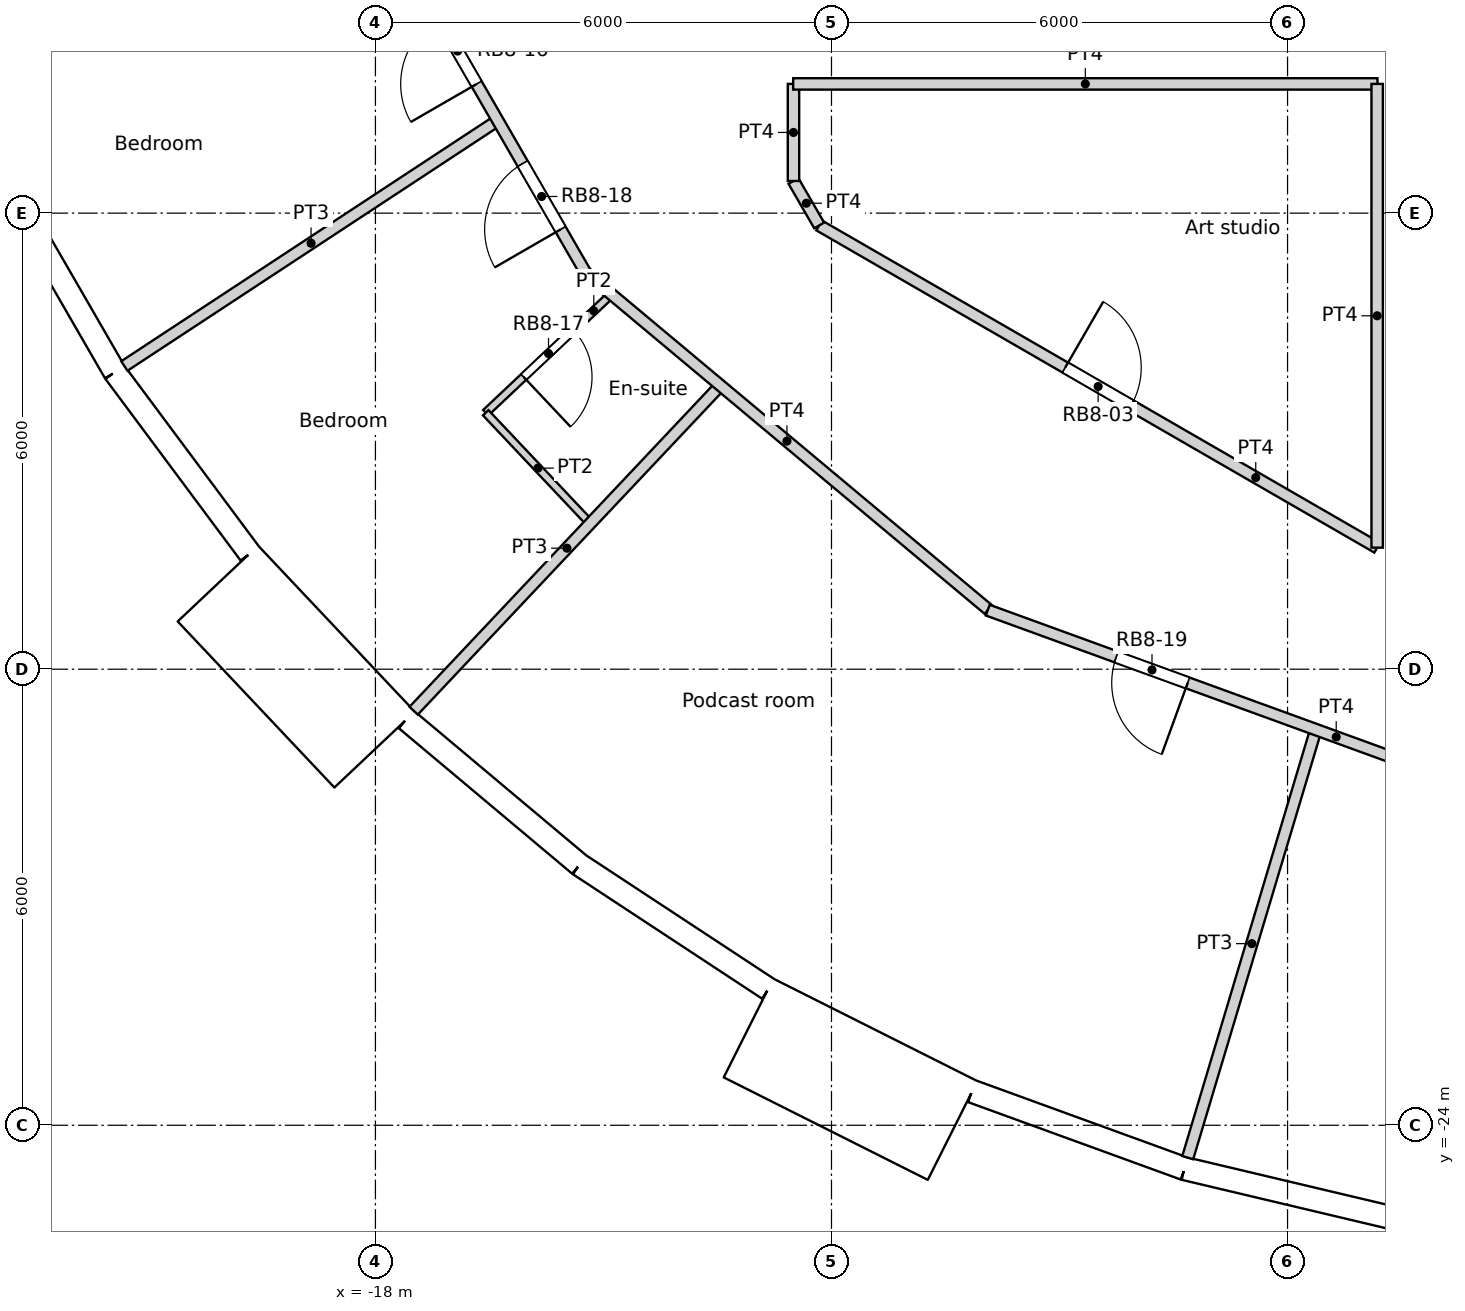
"""IFC4 building model, lengths in metres.
Left out: names, types, materials, properties, quantities, classifications, styles, units other than length and angle.
Written with IfcOpenShell. Run it as: python <this file> out.ifc"""

import sys

from ifc_helpers import new_model, si_unit, direction, frame, frame_2d, origin, origin_2d, place, context, subcontext, project, spatial, rectangle, circle, extrude, element, fill, save


model = new_model("IFC4")
c1 = context("Model", 3, precision=1e-05, world=origin(), true_north=direction((0.0, 1.0)))
c2 = subcontext(c1, "Body", "Model", "MODEL_VIEW")
j1 = project(units=[si_unit("LENGTHUNIT", "METRE"), si_unit("PLANEANGLEUNIT", "RADIAN")], contexts=[c1])
p1 = place(None, origin())
s1 = spatial("IfcSite", under=j1, at=p1, CompositionType="ELEMENT")
p2 = place(p1, origin())
s2 = spatial("IfcBuilding", under=s1, at=p2, CompositionType="ELEMENT")
p3 = place(p2, frame((0.0, 0.0, 201.6)))
s3 = spatial("IfcBuildingStorey", under=s2, at=p3, CompositionType="ELEMENT", Elevation=201.6)
for number, where, z_axis, x_axis in (
    (1, (-20.509, -13.489, 0.0), (0.0, 0.0, 1.0), (1.0, 0.0, 0.0)),
    (2, (-16.846, -17.855, 0.0), (0.0, 0.0, 1.0), (1.0, 0.0, 0.0)),
    (3, (-12.274, -21.259, 0.0), (0.0, 0.0, 1.0), (1.0, 0.0, 0.0)),
    (4, (-7.04, -23.516, 0.0), (0.0, 0.0, 1.0), (1.0, 0.0, 0.0)),
):
    element("IfcColumn", number, at=place(p3, frame(where, z_axis=z_axis, x_axis=x_axis)), inside=s3, PredefinedType="COLUMN", context=c2, shape_type="SweptSolid", body=[
        extrude(circle(Radius=0.6, at=origin_2d()), origin(), (0.0, 0.0, 1.0), 3.6),
    ])
for number, where, z_axis, x_axis in (
    (5, (-13.798, -12.802, 0.0), (0.0, 0.0, 1.0), (1.0, 0.0, 0.0)),
    (6, (-9.411, -16.301, 0.0), (0.0, 0.0, 1.0), (1.0, 0.0, 0.0)),
    (7, (-4.188, -18.35, 0.0), (0.0, 0.0, 1.0), (1.0, 0.0, 0.0)),
):
    element("IfcColumn", number, at=place(p3, frame(where, z_axis=z_axis, x_axis=x_axis)), inside=s3, PredefinedType="COLUMN", context=c2, shape_type="SweptSolid", body=[
        extrude(circle(Radius=0.65, at=origin_2d()), origin(), (0.0, 0.0, 1.0), 3.6),
    ])
p4 = place(p3, frame((-22.915, -11.519, 0.0), z_axis=(0.0, 0.0, 1.0), x_axis=(0.499954672104, -0.866051572276, 0.0)))
e8 = element("IfcWall", 8, at=p4, inside=s3, PredefinedType="SOLIDWALL", context=c2, shape_type="SweptSolid", body=[
    extrude(rectangle(XDim=2.973, YDim=0.3, at=frame_2d((1.486, 0.0))), origin(), (0.0, 0.0, 1.0), 3.3),
])
p5 = place(p4, frame((1.486, 0.0, 1.55)))
e9 = element("IfcOpeningElement", 9, at=p5, cuts=e8, PredefinedType="OPENING", context=c2, shape_type="SweptSolid", body=[
    extrude(circle(Radius=0.9, at=origin_2d()), frame((0.0, 0.16, 0.0), z_axis=(0.0, -1.0, 0.0), x_axis=(1.0, 0.0, 0.0)), (0.0, 0.0, 1.0), 0.32),
])
p6 = place(p3, frame((-21.428, -14.094, 0.0), z_axis=(0.0, 0.0, 1.0), x_axis=(0.597197580538, -0.80209416517, 0.0)))
e10 = element("IfcWall", 10, at=p6, inside=s3, PredefinedType="SOLIDWALL", context=c2, shape_type="SweptSolid", body=[
    extrude(rectangle(XDim=2.973, YDim=0.3, at=frame_2d((1.486, 0.0))), origin(), (0.0, 0.0, 1.0), 3.3),
])
p7 = place(p6, frame((1.486, 0.0, 1.55)))
e11 = element("IfcOpeningElement", 11, at=p7, cuts=e10, PredefinedType="OPENING", context=c2, shape_type="SweptSolid", body=[
    extrude(circle(Radius=0.9, at=origin_2d()), frame((0.0, 0.16, 0.0), z_axis=(0.0, -1.0, 0.0), x_axis=(1.0, 0.0, 0.0)), (0.0, 0.0, 1.0), 0.32),
])
p8 = place(p3, frame((-20.071, -16.874, -0.3), z_axis=(0.0, 0.0, 1.0), x_axis=(0.686217177108, -0.727396718334, 0.0)))
e12 = element("IfcWall", 12, at=p8, inside=s3, PredefinedType="ELEMENTEDWALL", context=c2, shape_type="SweptSolid", body=[
    extrude(rectangle(XDim=3.0, YDim=1.45, at=frame_2d((1.5, 0.0))), origin(), (0.0, 0.0, 1.0), 3.6),
])
p9 = place(p8, frame((1.5, 0.0, 1.85)))
e13 = element("IfcOpeningElement", 13, at=p9, cuts=e12, PredefinedType="OPENING", context=c2, shape_type="SweptSolid", body=[
    extrude(circle(Radius=0.9, at=origin_2d()), frame((0.0, 0.735, 0.0), z_axis=(0.0, -1.0, 0.0), x_axis=(1.0, 0.0, 0.0)), (0.0, 0.0, 1.0), 1.47),
])
p10 = place(p3, frame((-17.593, -18.661, 0.0), z_axis=(0.0, 0.0, 1.0), x_axis=(0.766008913364, -0.642829950023, 0.0)))
e14 = element("IfcWall", 14, at=p10, inside=s3, PredefinedType="SOLIDWALL", context=c2, shape_type="SweptSolid", body=[
    extrude(rectangle(XDim=2.973, YDim=0.3, at=frame_2d((1.486, 0.0))), origin(), (0.0, 0.0, 1.0), 3.3),
])
p11 = place(p10, frame((1.486, 0.0, 1.55)))
e15 = element("IfcOpeningElement", 15, at=p11, cuts=e14, PredefinedType="OPENING", context=c2, shape_type="SweptSolid", body=[
    extrude(circle(Radius=0.9, at=origin_2d()), frame((0.0, 0.16, 0.0), z_axis=(0.0, -1.0, 0.0), x_axis=(1.0, 0.0, 0.0)), (0.0, 0.0, 1.0), 0.32),
])
p12 = place(p3, frame((-15.316, -20.573, 0.0), z_axis=(0.0, 0.0, 1.0), x_axis=(0.835508361394, -0.54947773207, 0.0)))
e16 = element("IfcWall", 16, at=p12, inside=s3, PredefinedType="SOLIDWALL", context=c2, shape_type="SweptSolid", body=[
    extrude(rectangle(XDim=2.973, YDim=0.3, at=frame_2d((1.486, 0.0))), origin(), (0.0, 0.0, 1.0), 3.3),
])
p13 = place(p12, frame((1.486, 0.0, 1.55)))
e17 = element("IfcOpeningElement", 17, at=p13, cuts=e16, PredefinedType="OPENING", context=c2, shape_type="SweptSolid", body=[
    extrude(circle(Radius=0.9, at=origin_2d()), frame((0.0, 0.16, 0.0), z_axis=(0.0, -1.0, 0.0), x_axis=(1.0, 0.0, 0.0)), (0.0, 0.0, 1.0), 0.32),
])
p14 = place(p3, frame((-13.09, -22.721, -0.3), z_axis=(0.0, 0.0, 1.0), x_axis=(0.893628249713, -0.448807922518, 0.0)))
e18 = element("IfcWall", 18, at=p14, inside=s3, PredefinedType="ELEMENTEDWALL", context=c2, shape_type="SweptSolid", body=[
    extrude(rectangle(XDim=3.0, YDim=1.45, at=frame_2d((1.5, 0.0))), origin(), (0.0, 0.0, 1.0), 3.6),
])
p15 = place(p14, frame((1.5, 0.0, 1.85)))
e19 = element("IfcOpeningElement", 19, at=p15, cuts=e18, PredefinedType="OPENING", context=c2, shape_type="SweptSolid", body=[
    extrude(circle(Radius=0.9, at=origin_2d()), frame((0.0, 0.735, 0.0), z_axis=(0.0, -1.0, 0.0), x_axis=(1.0, 0.0, 0.0)), (0.0, 0.0, 1.0), 1.47),
])
p16 = place(p3, frame((-10.149, -23.553, 0.0), z_axis=(0.0, 0.0, 1.0), x_axis=(0.939690282133, -0.342026568652, 0.0)))
e20 = element("IfcWall", 20, at=p16, inside=s3, PredefinedType="SOLIDWALL", context=c2, shape_type="SweptSolid", body=[
    extrude(rectangle(XDim=2.973, YDim=0.3, at=frame_2d((1.486, 0.0))), origin(), (0.0, 0.0, 1.0), 3.3),
])
p17 = place(p16, frame((1.486, 0.0, 1.55)))
e21 = element("IfcOpeningElement", 21, at=p17, cuts=e20, PredefinedType="OPENING", context=c2, shape_type="SweptSolid", body=[
    extrude(circle(Radius=0.9, at=origin_2d()), frame((0.0, 0.16, 0.0), z_axis=(0.0, -1.0, 0.0), x_axis=(1.0, 0.0, 0.0)), (0.0, 0.0, 1.0), 0.32),
])
p18 = place(p3, frame((-7.356, -24.57, 0.0), z_axis=(0.0, 0.0, 1.0), x_axis=(0.973045378923, -0.230613725862, 0.0)))
e22 = element("IfcWall", 22, at=p18, inside=s3, PredefinedType="SOLIDWALL", context=c2, shape_type="SweptSolid", body=[
    extrude(rectangle(XDim=2.973, YDim=0.3, at=frame_2d((1.486, 0.0))), origin(), (0.0, 0.0, 1.0), 3.3),
])
p19 = place(p18, frame((1.486, 0.0, 1.55)))
e23 = element("IfcOpeningElement", 23, at=p19, cuts=e22, PredefinedType="OPENING", context=c2, shape_type="SweptSolid", body=[
    extrude(circle(Radius=0.9, at=origin_2d()), frame((0.0, 0.16, 0.0), z_axis=(0.0, -1.0, 0.0), x_axis=(1.0, 0.0, 0.0)), (0.0, 0.0, 1.0), 0.32),
])
p20 = place(p3, frame((-12.504, -10.3, 0.0), z_axis=(0.0, 0.0, 1.0), x_axis=(1.0, 0.0, 0.0)))
e24 = element("IfcWall", 24, at=p20, inside=s3, PredefinedType="PARTITIONING", context=c2, shape_type="SweptSolid", body=[
    extrude(rectangle(XDim=7.687, YDim=0.15, at=frame_2d((3.844, 0.0))), origin(), (0.0, 0.0, 1.0), 3.3),
])
p21 = place(p3, frame((-12.5, -11.577, 0.0), z_axis=(0.0, 0.0, 1.0), x_axis=(0.0, 1.0, 0.0)))
e25 = element("IfcWall", 25, at=p21, inside=s3, PredefinedType="PARTITIONING", context=c2, shape_type="SweptSolid", body=[
    extrude(rectangle(XDim=1.277, YDim=0.15, at=frame_2d((0.638, 0.0))), origin(), (0.0, 0.0, 1.0), 3.3),
])
p22 = place(p3, frame((-12.5, -11.577, 0.0), z_axis=(0.0, 0.0, 1.0), x_axis=(0.500024767483, -0.866011103799, 0.0)))
e26 = element("IfcWall", 26, at=p22, inside=s3, PredefinedType="PARTITIONING", context=c2, shape_type="SweptSolid", body=[
    extrude(rectangle(XDim=0.676, YDim=0.15, at=frame_2d((0.338, 0.0))), origin(), (0.0, 0.0, 1.0), 3.3),
])
p23 = place(p3, frame((-18.688, -6.802, 0.0), z_axis=(0.0, 0.0, 1.0), x_axis=(0.500009041241, -0.866020183759, 0.0)))
e27 = element("IfcWall", 27, at=p23, inside=s3, PredefinedType="PARTITIONING", context=c2, shape_type="SweptSolid", body=[
    extrude(rectangle(XDim=6.907, YDim=0.15, at=frame_2d((3.454, 0.0))), origin(), (0.0, 0.0, 1.0), 3.3),
])
p24 = place(p23, frame((3.04, 0.0, 0.0)))
e28 = element("IfcOpeningElement", 28, at=p24, cuts=e27, PredefinedType="OPENING", context=c2, shape_type="SweptSolid", body=[
    extrude(rectangle(XDim=1.0, YDim=2.1, at=frame_2d((0.5, 1.05))), frame((0.0, 0.075, 0.0), z_axis=(0.0, -1.0, 0.0), x_axis=(1.0, 0.0, 0.0)), (0.0, 0.0, 1.0), 0.15),
])
p25 = place(p23, frame((5.249, 0.0, 0.0)))
e29 = element("IfcOpeningElement", 29, at=p25, cuts=e27, PredefinedType="OPENING", context=c2, shape_type="SweptSolid", body=[
    extrude(rectangle(XDim=1.0, YDim=2.1, at=frame_2d((0.5, 1.05))), frame((0.0, 0.075, 0.0), z_axis=(0.0, -1.0, 0.0), x_axis=(1.0, 0.0, 0.0)), (0.0, 0.0, 1.0), 0.15),
])
p26 = place(p3, frame((-15.235, -12.784, 0.0), z_axis=(0.0, 0.0, 1.0), x_axis=(0.767110396068, -0.641515113029, 0.0)))
e30 = element("IfcWall", 30, at=p26, inside=s3, PredefinedType="PARTITIONING", context=c2, shape_type="SweptSolid", body=[
    extrude(rectangle(XDim=6.906, YDim=0.15, at=frame_2d((3.453, 0.0))), origin(), (0.0, 0.0, 1.0), 3.3),
])
p27 = place(p3, frame((-12.162, -12.162, 0.0), z_axis=(0.0, 0.0, 1.0), x_axis=(0.866004766557, -0.500035743023, 0.0)))
e31 = element("IfcWall", 31, at=p27, inside=s3, PredefinedType="PARTITIONING", context=c2, shape_type="SweptSolid", body=[
    extrude(rectangle(XDim=8.477, YDim=0.15, at=frame_2d((4.239, 0.0))), origin(), (0.0, 0.0, 1.0), 3.3),
])
p28 = place(p27, frame((3.738, 0.0, 0.0)))
e32 = element("IfcOpeningElement", 32, at=p28, cuts=e31, PredefinedType="OPENING", context=c2, shape_type="SweptSolid", body=[
    extrude(rectangle(XDim=1.0, YDim=2.04, at=frame_2d((0.5, 1.02))), frame((0.0, 0.075, 0.0), z_axis=(0.0, -1.0, 0.0), x_axis=(1.0, 0.0, 0.0)), (0.0, 0.0, 1.0), 0.15),
])
p29 = place(p3, frame((-4.821, -16.401, 0.0), z_axis=(0.0, 0.0, 1.0), x_axis=(0.0, 1.0, 0.0)))
e33 = element("IfcWall", 33, at=p29, inside=s3, PredefinedType="PARTITIONING", context=c2, shape_type="SweptSolid", body=[
    extrude(rectangle(XDim=6.101, YDim=0.15, at=frame_2d((3.05, 0.0))), origin(), (0.0, 0.0, 1.0), 3.3),
])
p30 = place(p3, frame((-9.944, -17.223, 0.0), z_axis=(0.0, 0.0, 1.0), x_axis=(0.939672634566, -0.342075050021, 0.0)))
e34 = element("IfcWall", 34, at=p30, inside=s3, PredefinedType="PARTITIONING", context=c2, shape_type="SweptSolid", body=[
    extrude(rectangle(XDim=6.908, YDim=0.15, at=frame_2d((3.454, 0.0))), origin(), (0.0, 0.0, 1.0), 3.3),
])
p31 = place(p30, frame((1.799, 0.0, 0.0)))
e35 = element("IfcOpeningElement", 35, at=p31, cuts=e34, PredefinedType="OPENING", context=c2, shape_type="SweptSolid", body=[
    extrude(rectangle(XDim=1.0, YDim=2.04, at=frame_2d((0.5, 1.02))), frame((0.0, 0.075, 0.0), z_axis=(0.0, -1.0, 0.0), x_axis=(1.0, 0.0, 0.0)), (0.0, 0.0, 1.0), 0.15),
])
p32 = place(p3, frame((-21.303, -14.011, 0.0), z_axis=(0.0, 0.0, 1.0), x_axis=(0.835534987945, 0.54943724293, 0.0)))
e36 = element("IfcWall", 36, at=p32, inside=s3, PredefinedType="PARTITIONING", context=c2, shape_type="SweptSolid", body=[
    extrude(rectangle(XDim=5.879, YDim=0.15, at=frame_2d((2.939, 0.0))), origin(), (0.0, 0.0, 1.0), 3.3),
])
p33 = place(p3, frame((-16.549, -14.626, 0.0), z_axis=(0.0, 0.0, 1.0), x_axis=(0.727754926423, 0.68583727448, 0.0)))
e37 = element("IfcWall", 37, at=p33, inside=s3, PredefinedType="PARTITIONING", context=c2, shape_type="SweptSolid", body=[
    extrude(rectangle(XDim=2.271, YDim=0.1, at=frame_2d((1.136, 0.0))), origin(), (0.0, 0.0, 1.0), 3.3),
])
p34 = place(p33, frame((0.686, 0.0, 0.0)))
e38 = element("IfcOpeningElement", 38, at=p34, cuts=e37, PredefinedType="OPENING", context=c2, shape_type="SweptSolid", body=[
    extrude(rectangle(XDim=0.9, YDim=2.04, at=frame_2d((0.45, 1.02))), frame((0.0, 0.05, 0.0), z_axis=(0.0, -1.0, 0.0), x_axis=(1.0, 0.0, 0.0)), (0.0, 0.0, 1.0), 0.1),
])
p35 = place(p3, frame((-16.549, -14.626, 0.0), z_axis=(0.0, 0.0, 1.0), x_axis=(0.686337209023, -0.727283462971, 0.0)))
e39 = element("IfcWall", 39, at=p35, inside=s3, PredefinedType="PARTITIONING", context=c2, shape_type="SweptSolid", body=[
    extrude(rectangle(XDim=2.003, YDim=0.1, at=frame_2d((1.002, 0.0))), origin(), (0.0, 0.0, 1.0), 3.3),
])
p36 = place(p3, frame((-17.497, -18.546, 0.0), z_axis=(0.0, 0.0, 1.0), x_axis=(0.68614289064, 0.727466792111, 0.0)))
e40 = element("IfcWall", 40, at=p36, inside=s3, PredefinedType="PARTITIONING", context=c2, shape_type="SweptSolid", body=[
    extrude(rectangle(XDim=5.878, YDim=0.15, at=frame_2d((2.939, 0.0))), origin(), (0.0, 0.0, 1.0), 3.3),
])
p37 = place(p3, frame((-7.313, -24.426, 0.0), z_axis=(0.0, 0.0, 1.0), x_axis=(0.286833432865, 0.957980470464, 0.0)))
e41 = element("IfcWall", 41, at=p37, inside=s3, PredefinedType="PARTITIONING", context=c2, shape_type="SweptSolid", body=[
    extrude(rectangle(XDim=5.878, YDim=0.15, at=frame_2d((2.939, 0.0))), origin(), (0.0, 0.0, 1.0), 3.3),
])
p38 = place(p5, origin())
e42 = element("IfcWindow", 42, at=p38, inside=s3, PartitioningType="SINGLE_PANEL", PredefinedType="WINDOW", context=c2, shape_type="SweptSolid", body=[
    extrude(circle(Radius=0.9, at=origin_2d()), frame((0.0, 0.12, 0.0), z_axis=(0.0, -1.0, 0.0), x_axis=(1.0, 0.0, 0.0)), (0.0, 0.0, 1.0), 0.1),
])
fill(e9, e42)
p39 = place(p7, origin())
e43 = element("IfcWindow", 43, at=p39, inside=s3, PartitioningType="SINGLE_PANEL", PredefinedType="WINDOW", context=c2, shape_type="SweptSolid", body=[
    extrude(circle(Radius=0.9, at=origin_2d()), frame((0.0, 0.12, 0.0), z_axis=(0.0, -1.0, 0.0), x_axis=(1.0, 0.0, 0.0)), (0.0, 0.0, 1.0), 0.1),
])
fill(e11, e43)
p40 = place(p9, origin())
e44 = element("IfcWindow", 44, at=p40, inside=s3, PartitioningType="SINGLE_PANEL", PredefinedType="WINDOW", context=c2, shape_type="SweptSolid", body=[
    extrude(circle(Radius=0.9, at=origin_2d()), frame((0.0, 0.695, 0.0), z_axis=(0.0, -1.0, 0.0), x_axis=(1.0, 0.0, 0.0)), (0.0, 0.0, 1.0), 0.1),
])
fill(e13, e44)
p41 = place(p11, origin())
e45 = element("IfcWindow", 45, at=p41, inside=s3, PartitioningType="SINGLE_PANEL", PredefinedType="WINDOW", context=c2, shape_type="SweptSolid", body=[
    extrude(circle(Radius=0.9, at=origin_2d()), frame((0.0, 0.12, 0.0), z_axis=(0.0, -1.0, 0.0), x_axis=(1.0, 0.0, 0.0)), (0.0, 0.0, 1.0), 0.1),
])
fill(e15, e45)
p42 = place(p13, origin())
e46 = element("IfcWindow", 46, at=p42, inside=s3, PartitioningType="SINGLE_PANEL", PredefinedType="WINDOW", context=c2, shape_type="SweptSolid", body=[
    extrude(circle(Radius=0.9, at=origin_2d()), frame((0.0, 0.12, 0.0), z_axis=(0.0, -1.0, 0.0), x_axis=(1.0, 0.0, 0.0)), (0.0, 0.0, 1.0), 0.1),
])
fill(e17, e46)
p43 = place(p15, origin())
e47 = element("IfcWindow", 47, at=p43, inside=s3, PartitioningType="SINGLE_PANEL", PredefinedType="WINDOW", context=c2, shape_type="SweptSolid", body=[
    extrude(circle(Radius=0.9, at=origin_2d()), frame((0.0, 0.695, 0.0), z_axis=(0.0, -1.0, 0.0), x_axis=(1.0, 0.0, 0.0)), (0.0, 0.0, 1.0), 0.1),
])
fill(e19, e47)
p44 = place(p17, origin())
e48 = element("IfcWindow", 48, at=p44, inside=s3, PartitioningType="SINGLE_PANEL", PredefinedType="WINDOW", context=c2, shape_type="SweptSolid", body=[
    extrude(circle(Radius=0.9, at=origin_2d()), frame((0.0, 0.12, 0.0), z_axis=(0.0, -1.0, 0.0), x_axis=(1.0, 0.0, 0.0)), (0.0, 0.0, 1.0), 0.1),
])
fill(e21, e48)
p45 = place(p19, origin())
e49 = element("IfcWindow", 49, at=p45, inside=s3, PartitioningType="SINGLE_PANEL", PredefinedType="WINDOW", context=c2, shape_type="SweptSolid", body=[
    extrude(circle(Radius=0.9, at=origin_2d()), frame((0.0, 0.12, 0.0), z_axis=(0.0, -1.0, 0.0), x_axis=(1.0, 0.0, 0.0)), (0.0, 0.0, 1.0), 0.1),
])
fill(e23, e49)
p46 = place(p28, origin())
e50 = element("IfcDoor", 50, at=p46, inside=s3, OperationType="SINGLE_SWING_LEFT", PredefinedType="DOOR", context=c2, shape_type="SweptSolid", body=[
    extrude(rectangle(XDim=1.0, YDim=2.04, at=frame_2d((0.5, 1.02))), frame((0.0, 0.025, 0.0), z_axis=(0.0, -1.0, 0.0), x_axis=(1.0, 0.0, 0.0)), (0.0, 0.0, 1.0), 0.05),
])
fill(e32, e50)
p47 = place(p24, origin())
e51 = element("IfcDoor", 51, at=p47, inside=s3, OperationType="SINGLE_SWING_LEFT", PredefinedType="DOOR", context=c2, shape_type="SweptSolid", body=[
    extrude(rectangle(XDim=1.0, YDim=2.1, at=frame_2d((0.5, 1.05))), frame((0.0, 0.025, 0.0), z_axis=(0.0, -1.0, 0.0), x_axis=(1.0, 0.0, 0.0)), (0.0, 0.0, 1.0), 0.05),
])
fill(e28, e51)
p48 = place(p34, origin())
e52 = element("IfcDoor", 52, at=p48, inside=s3, OperationType="SINGLE_SWING_RIGHT", PredefinedType="DOOR", context=c2, shape_type="SweptSolid", body=[
    extrude(rectangle(XDim=0.9, YDim=2.04, at=frame_2d((0.45, 1.02))), frame((0.0, 0.025, 0.0), z_axis=(0.0, -1.0, 0.0), x_axis=(1.0, 0.0, 0.0)), (0.0, 0.0, 1.0), 0.05),
])
fill(e38, e52)
p49 = place(p25, origin())
e53 = element("IfcDoor", 53, at=p49, inside=s3, OperationType="SINGLE_SWING_LEFT", PredefinedType="DOOR", context=c2, shape_type="SweptSolid", body=[
    extrude(rectangle(XDim=1.0, YDim=2.1, at=frame_2d((0.5, 1.05))), frame((0.0, 0.025, 0.0), z_axis=(0.0, -1.0, 0.0), x_axis=(1.0, 0.0, 0.0)), (0.0, 0.0, 1.0), 0.05),
])
fill(e29, e53)
p50 = place(p31, origin())
e54 = element("IfcDoor", 54, at=p50, inside=s3, OperationType="SINGLE_SWING_LEFT", PredefinedType="DOOR", context=c2, shape_type="SweptSolid", body=[
    extrude(rectangle(XDim=1.0, YDim=2.04, at=frame_2d((0.5, 1.02))), frame((0.0, 0.025, 0.0), z_axis=(0.0, -1.0, 0.0), x_axis=(1.0, 0.0, 0.0)), (0.0, 0.0, 1.0), 0.05),
])
fill(e35, e54)
save(model, sys.argv[1])
